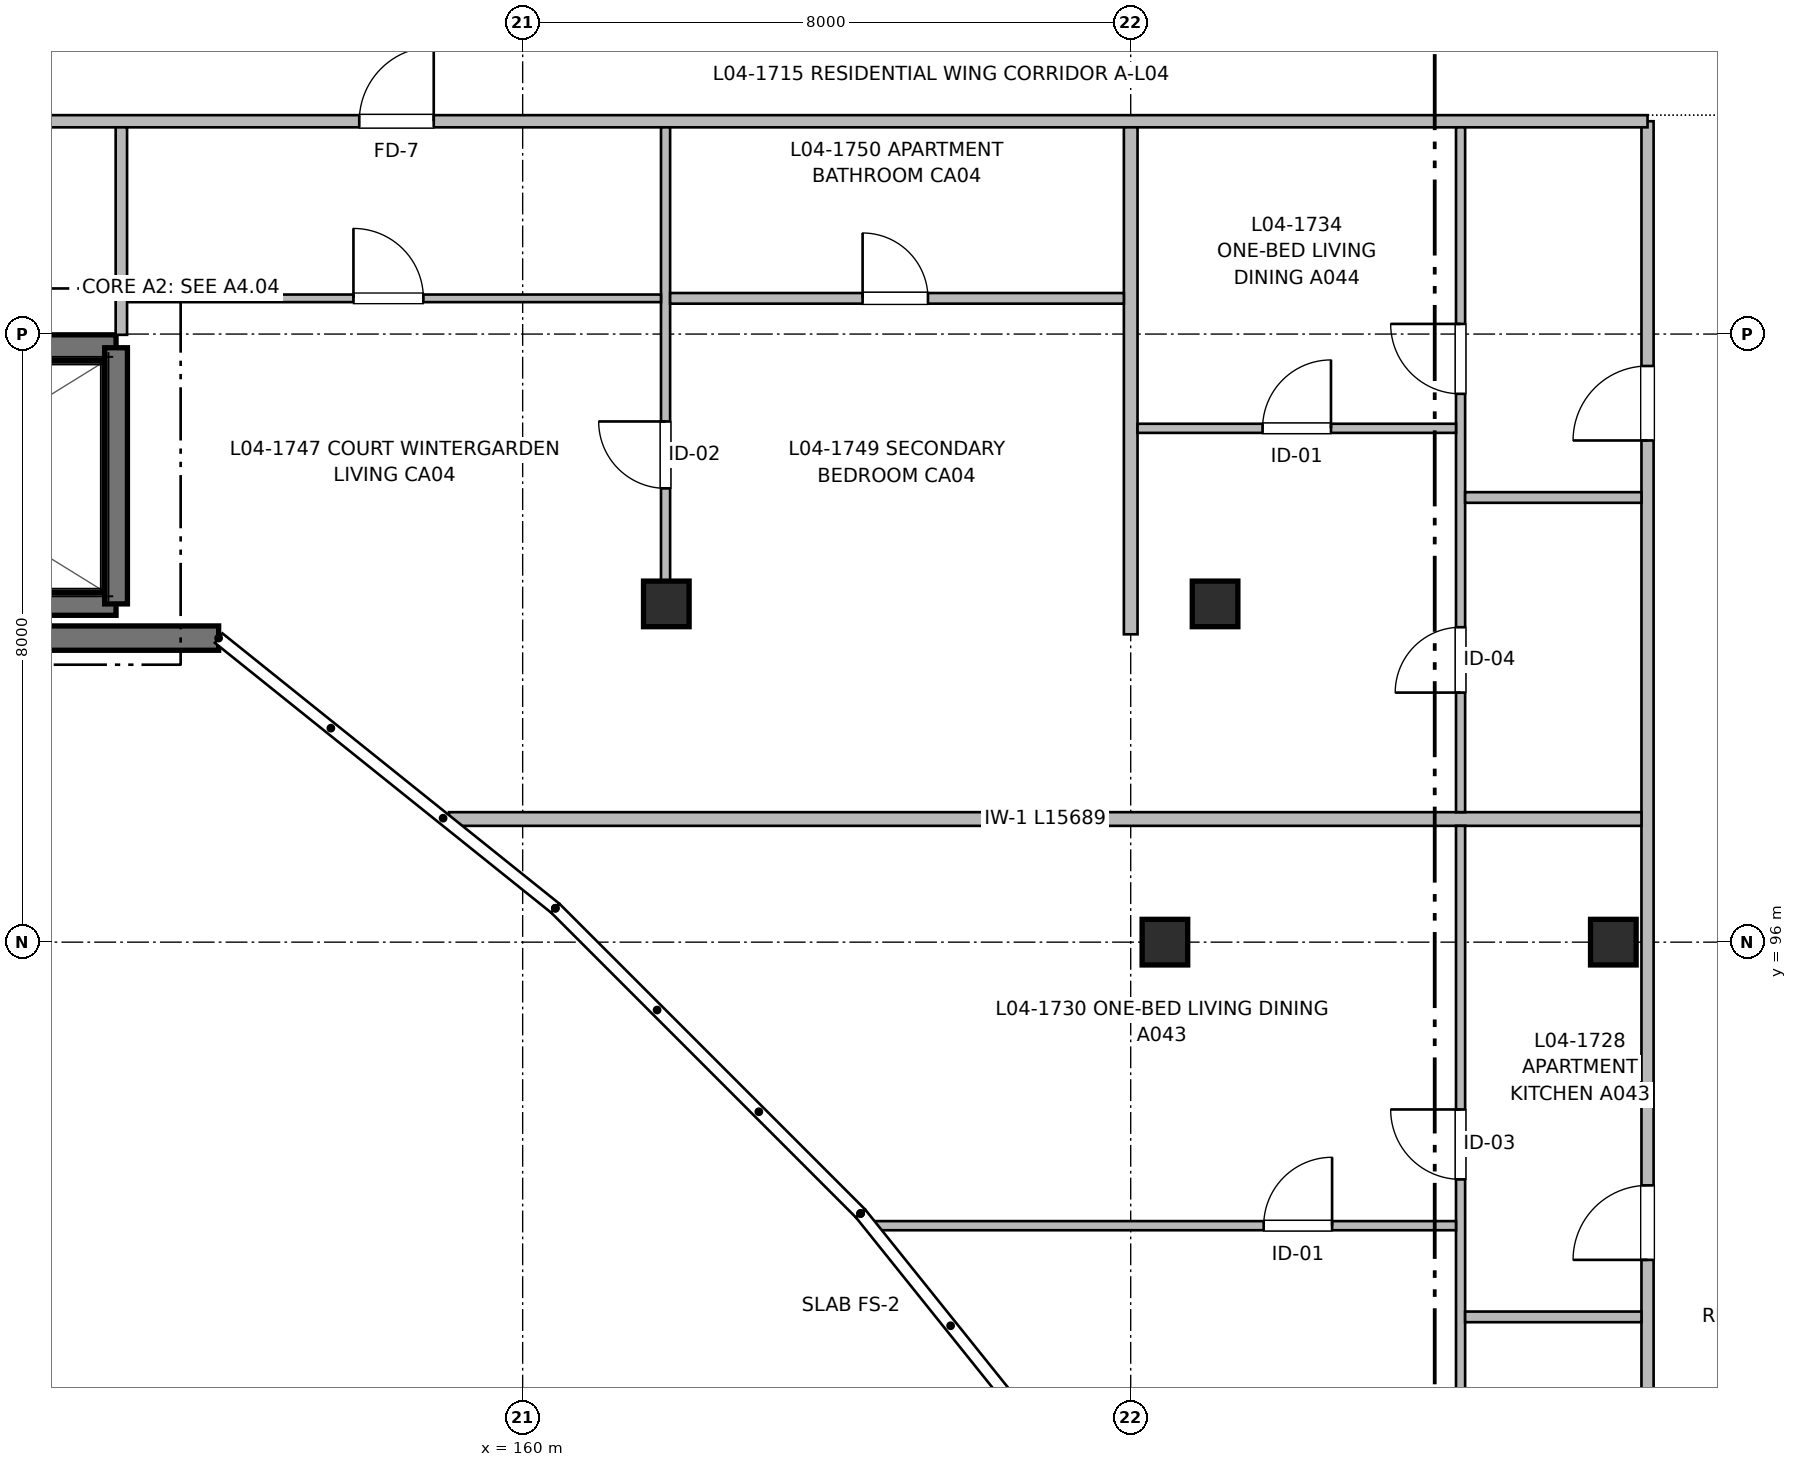
"""IFC4 building model, lengths in metres.
Left out: names, types, materials, properties, quantities, classifications, styles, units other than length and angle.
Written with IfcOpenShell. Run it as: python <this file> out.ifc"""

import sys

from ifc_helpers import new_model, si_unit, direction, frame, frame_2d, origin, origin_2d, place, context, subcontext, project, spatial, rectangle, extrude, element, fill, save


model = new_model("IFC4")
c1 = context("Model", 3, precision=1e-05, world=origin(), true_north=direction((0.0, 1.0)))
c2 = subcontext(c1, "Body", "Model", "MODEL_VIEW")
j1 = project(units=[si_unit("LENGTHUNIT", "METRE"), si_unit("PLANEANGLEUNIT", "RADIAN")], contexts=[c1])
p1 = place(None, origin())
s1 = spatial("IfcSite", under=j1, at=p1, CompositionType="ELEMENT")
p2 = place(p1, origin())
s2 = spatial("IfcBuilding", under=s1, at=p2, CompositionType="ELEMENT")
p3 = place(p2, frame((0.0, 0.0, 13.76)))
s3 = spatial("IfcBuildingStorey", under=s2, at=p3, CompositionType="ELEMENT", Elevation=13.76)
for number, where, z_axis, x_axis in (
    (1, (161.89, 100.45, 0.0), (0.0, 0.0, 1.0), (1.0, 0.0, 0.0)),
    (2, (168.45, 96.0, 0.0), (0.0, 0.0, 1.0), (1.0, 0.0, 0.0)),
    (3, (169.11, 100.45, 0.0), (0.0, 0.0, 1.0), (1.0, 0.0, 0.0)),
    (4, (174.35, 96.0, 0.0), (0.0, 0.0, 1.0), (1.0, 0.0, 0.0)),
):
    element("IfcColumn", number, at=place(p3, frame(where, z_axis=z_axis, x_axis=x_axis)), inside=s3, PredefinedType="COLUMN", context=c2, shape_type="SweptSolid", body=[
        extrude(rectangle(XDim=0.6, YDim=0.6, at=origin_2d()), origin(), (0.0, 0.0, 1.0), 3.2),
    ])
p4 = place(p3, frame((147.75, 100.45, 0.0), z_axis=(0.0, 0.0, 1.0), x_axis=(1.0, 0.0, 0.0)))
e5 = element("IfcWall", 5, at=p4, inside=s3, PredefinedType="SHEAR", context=c2, shape_type="SweptSolid", body=[
    extrude(rectangle(XDim=6.9, YDim=0.3, at=frame_2d((3.45, 0.0))), origin(), (0.0, 0.0, 1.0), 3.2),
])
p5 = place(p3, frame((154.65, 103.82, 0.0), z_axis=(0.0, 0.0, 1.0), x_axis=(-1.0, 0.0, 0.0)))
e6 = element("IfcWall", 6, at=p5, inside=s3, PredefinedType="SHEAR", context=c2, shape_type="SweptSolid", body=[
    extrude(rectangle(XDim=6.9, YDim=0.34, at=frame_2d((3.45, 0.0))), origin(), (0.0, 0.0, 1.0), 3.2),
])
p6 = place(p5, frame((5.25, 0.0, 0.0)))
e7 = element("IfcOpeningElement", 7, at=p6, cuts=e6, PredefinedType="OPENING", context=c2, shape_type="SweptSolid", body=[
    extrude(rectangle(XDim=1.05, YDim=2.15, at=frame_2d((0.525, 1.075))), frame((0.0, 0.18, 0.0), z_axis=(0.0, -1.0, 0.0), x_axis=(1.0, 0.0, 0.0)), (0.0, 0.0, 1.0), 0.36),
])
p7 = place(p3, frame((154.65, 100.45, 0.0), z_axis=(0.0, 0.0, 1.0), x_axis=(0.0, 1.0, 0.0)))
e8 = element("IfcWall", 8, at=p7, inside=s3, PredefinedType="SHEAR", context=c2, shape_type="SweptSolid", body=[
    extrude(rectangle(XDim=3.37, YDim=0.3, at=frame_2d((1.685, 0.0))), origin(), (0.0, 0.0, 1.0), 3.2),
])
p8 = place(p3, frame((156.0, 100.0, 0.0), z_axis=(0.0, 0.0, 1.0), x_axis=(-1.0, 0.0, 0.0)))
e9 = element("IfcWall", 9, at=p8, inside=s3, PredefinedType="SHEAR", context=c2, shape_type="SweptSolid", body=[
    extrude(rectangle(XDim=9.0, YDim=0.32, at=frame_2d((4.5, 0.0))), origin(), (0.0, 0.0, 1.0), 2.98),
])
p9 = place(p8, frame((3.6, 0.0, 0.72)))
e10 = element("IfcOpeningElement", 10, at=p9, cuts=e9, PredefinedType="OPENING", context=c2, shape_type="SweptSolid", body=[
    extrude(rectangle(XDim=1.8, YDim=1.5, at=frame_2d((0.9, 0.75))), frame((0.0, 0.17, 0.0), z_axis=(0.0, -1.0, 0.0), x_axis=(1.0, 0.0, 0.0)), (0.0, 0.0, 1.0), 0.34),
])
p10 = place(p3, frame((174.8, 56.16, 0.0), z_axis=(0.0, 0.0, 1.0), x_axis=(0.0, 1.0, 0.0)))
e11 = element("IfcWall", 11, at=p10, inside=s3, PredefinedType="PARTITIONING", context=c2, shape_type="SweptSolid", body=[
    extrude(rectangle(XDim=50.64, YDim=0.16, at=frame_2d((25.32, 0.0))), origin(), (0.0, 0.0, 1.0), 2.935),
])
p11 = place(p10, frame((8.49, 0.0, 0.0)))
e12 = element("IfcOpeningElement", 12, at=p11, cuts=e11, PredefinedType="OPENING", context=c2, shape_type="SweptSolid", body=[
    extrude(rectangle(XDim=0.98, YDim=2.15, at=frame_2d((0.49, 1.075))), frame((0.0, 0.09, 0.0), z_axis=(0.0, -1.0, 0.0), x_axis=(1.0, 0.0, 0.0)), (0.0, 0.0, 1.0), 0.18),
])
p12 = place(p10, frame((22.04, 0.0, 0.0)))
e13 = element("IfcOpeningElement", 13, at=p12, cuts=e11, PredefinedType="OPENING", context=c2, shape_type="SweptSolid", body=[
    extrude(rectangle(XDim=0.98, YDim=2.15, at=frame_2d((0.49, 1.075))), frame((0.0, 0.09, 0.0), z_axis=(0.0, -1.0, 0.0), x_axis=(1.0, 0.0, 0.0)), (0.0, 0.0, 1.0), 0.18),
])
p13 = place(p10, frame((35.66, 0.0, 0.0)))
e14 = element("IfcOpeningElement", 14, at=p13, cuts=e11, PredefinedType="OPENING", context=c2, shape_type="SweptSolid", body=[
    extrude(rectangle(XDim=0.98, YDim=2.15, at=frame_2d((0.49, 1.075))), frame((0.0, 0.09, 0.0), z_axis=(0.0, -1.0, 0.0), x_axis=(1.0, 0.0, 0.0)), (0.0, 0.0, 1.0), 0.18),
])
p14 = place(p10, frame((46.44, 0.0, 0.0)))
e15 = element("IfcOpeningElement", 15, at=p14, cuts=e11, PredefinedType="OPENING", context=c2, shape_type="SweptSolid", body=[
    extrude(rectangle(XDim=0.98, YDim=2.15, at=frame_2d((0.49, 1.075))), frame((0.0, 0.09, 0.0), z_axis=(0.0, -1.0, 0.0), x_axis=(1.0, 0.0, 0.0)), (0.0, 0.0, 1.0), 0.18),
])
p15 = place(p3, frame((147.16, 106.8, 0.0), z_axis=(0.0, 0.0, 1.0), x_axis=(1.0, 0.0, 0.0)))
e16 = element("IfcWall", 16, at=p15, inside=s3, PredefinedType="PARTITIONING", context=c2, shape_type="SweptSolid", body=[
    extrude(rectangle(XDim=27.64, YDim=0.16, at=frame_2d((13.82, 0.0))), origin(), (0.0, 0.0, 1.0), 2.935),
])
p16 = place(p15, frame((3.515, 0.0, 0.0)))
e17 = element("IfcOpeningElement", 17, at=p16, cuts=e16, PredefinedType="OPENING", context=c2, shape_type="SweptSolid", body=[
    extrude(rectangle(XDim=1.05, YDim=2.15, at=frame_2d((0.525, 1.075))), frame((0.0, 0.09, 0.0), z_axis=(0.0, -1.0, 0.0), x_axis=(1.0, 0.0, 0.0)), (0.0, 0.0, 1.0), 0.18),
])
p17 = place(p15, frame((10.69, 0.0, 0.0)))
e18 = element("IfcOpeningElement", 18, at=p17, cuts=e16, PredefinedType="OPENING", context=c2, shape_type="SweptSolid", body=[
    extrude(rectangle(XDim=0.98, YDim=2.15, at=frame_2d((0.49, 1.075))), frame((0.0, 0.09, 0.0), z_axis=(0.0, -1.0, 0.0), x_axis=(1.0, 0.0, 0.0)), (0.0, 0.0, 1.0), 0.18),
])
p18 = place(p3, frame((168.0, 100.05, 0.0), z_axis=(0.0, 0.0, 1.0), x_axis=(0.0, 1.0, 0.0)))
e19 = element("IfcWall", 19, at=p18, inside=s3, PredefinedType="PARTITIONING", context=c2, shape_type="SweptSolid", body=[
    extrude(rectangle(XDim=6.67, YDim=0.18, at=frame_2d((3.335, 0.0))), origin(), (0.0, 0.0, 1.0), 2.935),
])
p19 = place(p3, frame((154.72, 103.99, 0.0), z_axis=(0.0, 0.0, 1.0), x_axis=(0.0, 1.0, 0.0)))
e20 = element("IfcWall", 20, at=p19, inside=s3, PredefinedType="PARTITIONING", context=c2, shape_type="SweptSolid", body=[
    extrude(rectangle(XDim=2.73, YDim=0.15, at=frame_2d((1.365, 0.0))), origin(), (0.0, 0.0, 1.0), 2.935),
])
p20 = place(p3, frame((159.031, 97.62, 0.0), z_axis=(0.0, 0.0, 1.0), x_axis=(1.0, 0.0, 0.0)))
e21 = element("IfcWall", 21, at=p20, inside=s3, PredefinedType="PARTITIONING", context=c2, shape_type="SweptSolid", body=[
    extrude(rectangle(XDim=15.689, YDim=0.18, at=frame_2d((7.845, 0.0))), origin(), (0.0, 0.0, 1.0), 2.935),
])
p21 = place(p3, frame((172.34, 85.57, 0.0), z_axis=(0.0, 0.0, 1.0), x_axis=(0.0, 1.0, 0.0)))
e22 = element("IfcWall", 22, at=p21, inside=s3, PredefinedType="PARTITIONING", context=c2, shape_type="SweptSolid", body=[
    extrude(rectangle(XDim=11.96, YDim=0.12, at=frame_2d((5.98, 0.0))), origin(), (0.0, 0.0, 1.0), 2.935),
])
p22 = place(p21, frame((2.09, 0.0, 0.0)))
e23 = element("IfcOpeningElement", 23, at=p22, cuts=e22, PredefinedType="OPENING", context=c2, shape_type="SweptSolid", body=[
    extrude(rectangle(XDim=0.86, YDim=2.1, at=frame_2d((0.43, 1.05))), frame((0.0, 0.07, 0.0), z_axis=(0.0, -1.0, 0.0), x_axis=(1.0, 0.0, 0.0)), (0.0, 0.0, 1.0), 0.14),
])
p23 = place(p21, frame((7.309, 0.0, 0.0)))
e24 = element("IfcOpeningElement", 24, at=p23, cuts=e22, PredefinedType="OPENING", context=c2, shape_type="SweptSolid", body=[
    extrude(rectangle(XDim=0.92, YDim=2.1, at=frame_2d((0.46, 1.05))), frame((0.0, 0.07, 0.0), z_axis=(0.0, -1.0, 0.0), x_axis=(1.0, 0.0, 0.0)), (0.0, 0.0, 1.0), 0.14),
])
p24 = place(p3, frame((172.4, 91.07, 0.0), z_axis=(0.0, 0.0, 1.0), x_axis=(1.0, 0.0, 0.0)))
e25 = element("IfcWall", 25, at=p24, inside=s3, PredefinedType="PARTITIONING", context=c2, shape_type="SweptSolid", body=[
    extrude(rectangle(XDim=2.32, YDim=0.14, at=frame_2d((1.16, 0.0))), origin(), (0.0, 0.0, 1.0), 2.935),
])
p25 = place(p3, frame((164.625, 92.27, 0.0), z_axis=(0.0, 0.0, 1.0), x_axis=(1.0, 0.0, 0.0)))
e26 = element("IfcWall", 26, at=p25, inside=s3, PredefinedType="PARTITIONING", context=c2, shape_type="SweptSolid", body=[
    extrude(rectangle(XDim=7.655, YDim=0.12, at=frame_2d((3.827, 0.0))), origin(), (0.0, 0.0, 1.0), 2.935),
])
p26 = place(p25, frame((5.124, 0.0, 0.0)))
e27 = element("IfcOpeningElement", 27, at=p26, cuts=e26, PredefinedType="OPENING", context=c2, shape_type="SweptSolid", body=[
    extrude(rectangle(XDim=0.9, YDim=2.1, at=frame_2d((0.45, 1.05))), frame((0.0, 0.07, 0.0), z_axis=(0.0, -1.0, 0.0), x_axis=(1.0, 0.0, 0.0)), (0.0, 0.0, 1.0), 0.14),
])
p27 = place(p3, frame((172.34, 97.71, 0.0), z_axis=(0.0, 0.0, 1.0), x_axis=(0.0, 1.0, 0.0)))
e28 = element("IfcWall", 28, at=p27, inside=s3, PredefinedType="PARTITIONING", context=c2, shape_type="SweptSolid", body=[
    extrude(rectangle(XDim=9.01, YDim=0.12, at=frame_2d((4.505, 0.0))), origin(), (0.0, 0.0, 1.0), 2.935),
])
p28 = place(p27, frame((1.573, 0.0, 0.0)))
e29 = element("IfcOpeningElement", 29, at=p28, cuts=e28, PredefinedType="OPENING", context=c2, shape_type="SweptSolid", body=[
    extrude(rectangle(XDim=0.86, YDim=2.1, at=frame_2d((0.43, 1.05))), frame((0.0, 0.07, 0.0), z_axis=(0.0, -1.0, 0.0), x_axis=(1.0, 0.0, 0.0)), (0.0, 0.0, 1.0), 0.14),
])
p29 = place(p27, frame((5.504, 0.0, 0.0)))
e30 = element("IfcOpeningElement", 30, at=p29, cuts=e28, PredefinedType="OPENING", context=c2, shape_type="SweptSolid", body=[
    extrude(rectangle(XDim=0.92, YDim=2.1, at=frame_2d((0.46, 1.05))), frame((0.0, 0.07, 0.0), z_axis=(0.0, -1.0, 0.0), x_axis=(1.0, 0.0, 0.0)), (0.0, 0.0, 1.0), 0.14),
])
p30 = place(p3, frame((172.4, 101.85, 0.0), z_axis=(0.0, 0.0, 1.0), x_axis=(1.0, 0.0, 0.0)))
e31 = element("IfcWall", 31, at=p30, inside=s3, PredefinedType="PARTITIONING", context=c2, shape_type="SweptSolid", body=[
    extrude(rectangle(XDim=2.32, YDim=0.14, at=frame_2d((1.16, 0.0))), origin(), (0.0, 0.0, 1.0), 2.935),
])
p31 = place(p3, frame((168.09, 102.76, 0.0), z_axis=(0.0, 0.0, 1.0), x_axis=(1.0, 0.0, 0.0)))
e32 = element("IfcWall", 32, at=p31, inside=s3, PredefinedType="PARTITIONING", context=c2, shape_type="SweptSolid", body=[
    extrude(rectangle(XDim=4.19, YDim=0.12, at=frame_2d((2.095, 0.0))), origin(), (0.0, 0.0, 1.0), 2.935),
])
p32 = place(p31, frame((1.645, 0.0, 0.0)))
e33 = element("IfcOpeningElement", 33, at=p32, cuts=e32, PredefinedType="OPENING", context=c2, shape_type="SweptSolid", body=[
    extrude(rectangle(XDim=0.9, YDim=2.1, at=frame_2d((0.45, 1.05))), frame((0.0, 0.07, 0.0), z_axis=(0.0, -1.0, 0.0), x_axis=(1.0, 0.0, 0.0)), (0.0, 0.0, 1.0), 0.14),
])
p33 = place(p3, frame((161.88, 100.16, 0.0), z_axis=(0.0, 0.0, 1.0), x_axis=(0.0, 1.0, 0.0)))
e34 = element("IfcWall", 34, at=p33, inside=s3, PredefinedType="PARTITIONING", context=c2, shape_type="SweptSolid", body=[
    extrude(rectangle(XDim=6.56, YDim=0.12, at=frame_2d((3.28, 0.0))), origin(), (0.0, 0.0, 1.0), 2.68),
])
p34 = place(p33, frame((1.81, 0.0, 0.0)))
e35 = element("IfcOpeningElement", 35, at=p34, cuts=e34, PredefinedType="OPENING", context=c2, shape_type="SweptSolid", body=[
    extrude(rectangle(XDim=0.88, YDim=2.1, at=frame_2d((0.44, 1.05))), frame((0.0, 0.07, 0.0), z_axis=(0.0, -1.0, 0.0), x_axis=(1.0, 0.0, 0.0)), (0.0, 0.0, 1.0), 0.14),
])
p35 = place(p3, frame((161.94, 104.47, 0.0), z_axis=(0.0, 0.0, 1.0), x_axis=(1.0, 0.0, 0.0)))
e36 = element("IfcWall", 36, at=p35, inside=s3, PredefinedType="PARTITIONING", context=c2, shape_type="SweptSolid", body=[
    extrude(rectangle(XDim=5.97, YDim=0.14, at=frame_2d((2.985, 0.0))), origin(), (0.0, 0.0, 1.0), 2.935),
])
p36 = place(p35, frame((2.533, 0.0, 0.0)))
e37 = element("IfcOpeningElement", 37, at=p36, cuts=e36, PredefinedType="OPENING", context=c2, shape_type="SweptSolid", body=[
    extrude(rectangle(XDim=0.86, YDim=2.1, at=frame_2d((0.43, 1.05))), frame((0.0, 0.08, 0.0), z_axis=(0.0, -1.0, 0.0), x_axis=(1.0, 0.0, 0.0)), (0.0, 0.0, 1.0), 0.16),
])
p37 = place(p3, frame((154.8, 104.47, 0.0), z_axis=(0.0, 0.0, 1.0), x_axis=(1.0, 0.0, 0.0)))
e38 = element("IfcWall", 38, at=p37, inside=s3, PredefinedType="PARTITIONING", context=c2, shape_type="SweptSolid", body=[
    extrude(rectangle(XDim=7.02, YDim=0.1, at=frame_2d((3.51, 0.0))), origin(), (0.0, 0.0, 1.0), 2.935),
])
p38 = place(p37, frame((2.974, 0.0, 0.0)))
e39 = element("IfcOpeningElement", 39, at=p38, cuts=e38, PredefinedType="OPENING", context=c2, shape_type="SweptSolid", body=[
    extrude(rectangle(XDim=0.92, YDim=2.1, at=frame_2d((0.46, 1.05))), frame((0.0, 0.06, 0.0), z_axis=(0.0, -1.0, 0.0), x_axis=(1.0, 0.0, 0.0)), (0.0, 0.0, 1.0), 0.12),
])
p39 = place(p23, origin())
e40 = element("IfcDoor", 40, at=p39, inside=s3, OperationType="SINGLE_SWING_RIGHT", PredefinedType="DOOR", context=c2, shape_type="SweptSolid", body=[
    extrude(rectangle(XDim=0.92, YDim=2.1, at=frame_2d((0.46, 1.05))), frame((0.0, 0.025, 0.0), z_axis=(0.0, -1.0, 0.0), x_axis=(1.0, 0.0, 0.0)), (0.0, 0.0, 1.0), 0.05),
])
fill(e24, e40)
p40 = place(p13, origin())
e41 = element("IfcDoor", 41, at=p40, inside=s3, OperationType="SINGLE_SWING_LEFT", PredefinedType="DOOR", context=c2, shape_type="SweptSolid", body=[
    extrude(rectangle(XDim=0.98, YDim=2.15, at=frame_2d((0.49, 1.075))), frame((0.0, 0.025, 0.0), z_axis=(0.0, -1.0, 0.0), x_axis=(1.0, 0.0, 0.0)), (0.0, 0.0, 1.0), 0.05),
])
fill(e14, e41)
p41 = place(p26, origin())
e42 = element("IfcDoor", 42, at=p41, inside=s3, OperationType="SINGLE_SWING_RIGHT", PredefinedType="DOOR", context=c2, shape_type="SweptSolid", body=[
    extrude(rectangle(XDim=0.9, YDim=2.1, at=frame_2d((0.45, 1.05))), frame((0.0, 0.025, 0.0), z_axis=(0.0, -1.0, 0.0), x_axis=(1.0, 0.0, 0.0)), (0.0, 0.0, 1.0), 0.05),
])
fill(e27, e42)
p42 = place(p28, origin())
e43 = element("IfcDoor", 43, at=p42, inside=s3, OperationType="SINGLE_SWING_LEFT", PredefinedType="DOOR", context=c2, shape_type="SweptSolid", body=[
    extrude(rectangle(XDim=0.86, YDim=2.1, at=frame_2d((0.43, 1.05))), frame((0.0, 0.025, 0.0), z_axis=(0.0, -1.0, 0.0), x_axis=(1.0, 0.0, 0.0)), (0.0, 0.0, 1.0), 0.05),
])
fill(e29, e43)
p43 = place(p29, origin())
e44 = element("IfcDoor", 44, at=p43, inside=s3, OperationType="SINGLE_SWING_RIGHT", PredefinedType="DOOR", context=c2, shape_type="SweptSolid", body=[
    extrude(rectangle(XDim=0.92, YDim=2.1, at=frame_2d((0.46, 1.05))), frame((0.0, 0.025, 0.0), z_axis=(0.0, -1.0, 0.0), x_axis=(1.0, 0.0, 0.0)), (0.0, 0.0, 1.0), 0.05),
])
fill(e30, e44)
p44 = place(p14, origin())
e45 = element("IfcDoor", 45, at=p44, inside=s3, OperationType="SINGLE_SWING_LEFT", PredefinedType="DOOR", context=c2, shape_type="SweptSolid", body=[
    extrude(rectangle(XDim=0.98, YDim=2.15, at=frame_2d((0.49, 1.075))), frame((0.0, 0.025, 0.0), z_axis=(0.0, -1.0, 0.0), x_axis=(1.0, 0.0, 0.0)), (0.0, 0.0, 1.0), 0.05),
])
fill(e15, e45)
p45 = place(p32, origin())
e46 = element("IfcDoor", 46, at=p45, inside=s3, OperationType="SINGLE_SWING_RIGHT", PredefinedType="DOOR", context=c2, shape_type="SweptSolid", body=[
    extrude(rectangle(XDim=0.9, YDim=2.1, at=frame_2d((0.45, 1.05))), frame((0.0, 0.025, 0.0), z_axis=(0.0, -1.0, 0.0), x_axis=(1.0, 0.0, 0.0)), (0.0, 0.0, 1.0), 0.05),
])
fill(e33, e46)
p46 = place(p17, origin())
e47 = element("IfcDoor", 47, at=p46, inside=s3, OperationType="SINGLE_SWING_RIGHT", PredefinedType="DOOR", context=c2, shape_type="SweptSolid", body=[
    extrude(rectangle(XDim=0.98, YDim=2.15, at=frame_2d((0.49, 1.075))), frame((0.0, 0.025, 0.0), z_axis=(0.0, -1.0, 0.0), x_axis=(1.0, 0.0, 0.0)), (0.0, 0.0, 1.0), 0.05),
])
fill(e18, e47)
p47 = place(p38, origin())
e48 = element("IfcDoor", 48, at=p47, inside=s3, OperationType="SINGLE_SWING_LEFT", PredefinedType="DOOR", context=c2, shape_type="SweptSolid", body=[
    extrude(rectangle(XDim=0.92, YDim=2.1, at=frame_2d((0.46, 1.05))), frame((0.0, 0.025, 0.0), z_axis=(0.0, -1.0, 0.0), x_axis=(1.0, 0.0, 0.0)), (0.0, 0.0, 1.0), 0.05),
])
fill(e39, e48)
p48 = place(p34, origin())
e49 = element("IfcDoor", 49, at=p48, inside=s3, OperationType="SINGLE_SWING_RIGHT", PredefinedType="DOOR", context=c2, shape_type="SweptSolid", body=[
    extrude(rectangle(XDim=0.88, YDim=2.1, at=frame_2d((0.44, 1.05))), frame((0.0, 0.025, 0.0), z_axis=(0.0, -1.0, 0.0), x_axis=(1.0, 0.0, 0.0)), (0.0, 0.0, 1.0), 0.05),
])
fill(e35, e49)
p49 = place(p36, origin())
e50 = element("IfcDoor", 50, at=p49, inside=s3, OperationType="SINGLE_SWING_LEFT", PredefinedType="DOOR", context=c2, shape_type="SweptSolid", body=[
    extrude(rectangle(XDim=0.86, YDim=2.1, at=frame_2d((0.43, 1.05))), frame((0.0, 0.025, 0.0), z_axis=(0.0, -1.0, 0.0), x_axis=(1.0, 0.0, 0.0)), (0.0, 0.0, 1.0), 0.05),
])
fill(e37, e50)
save(model, sys.argv[1])
